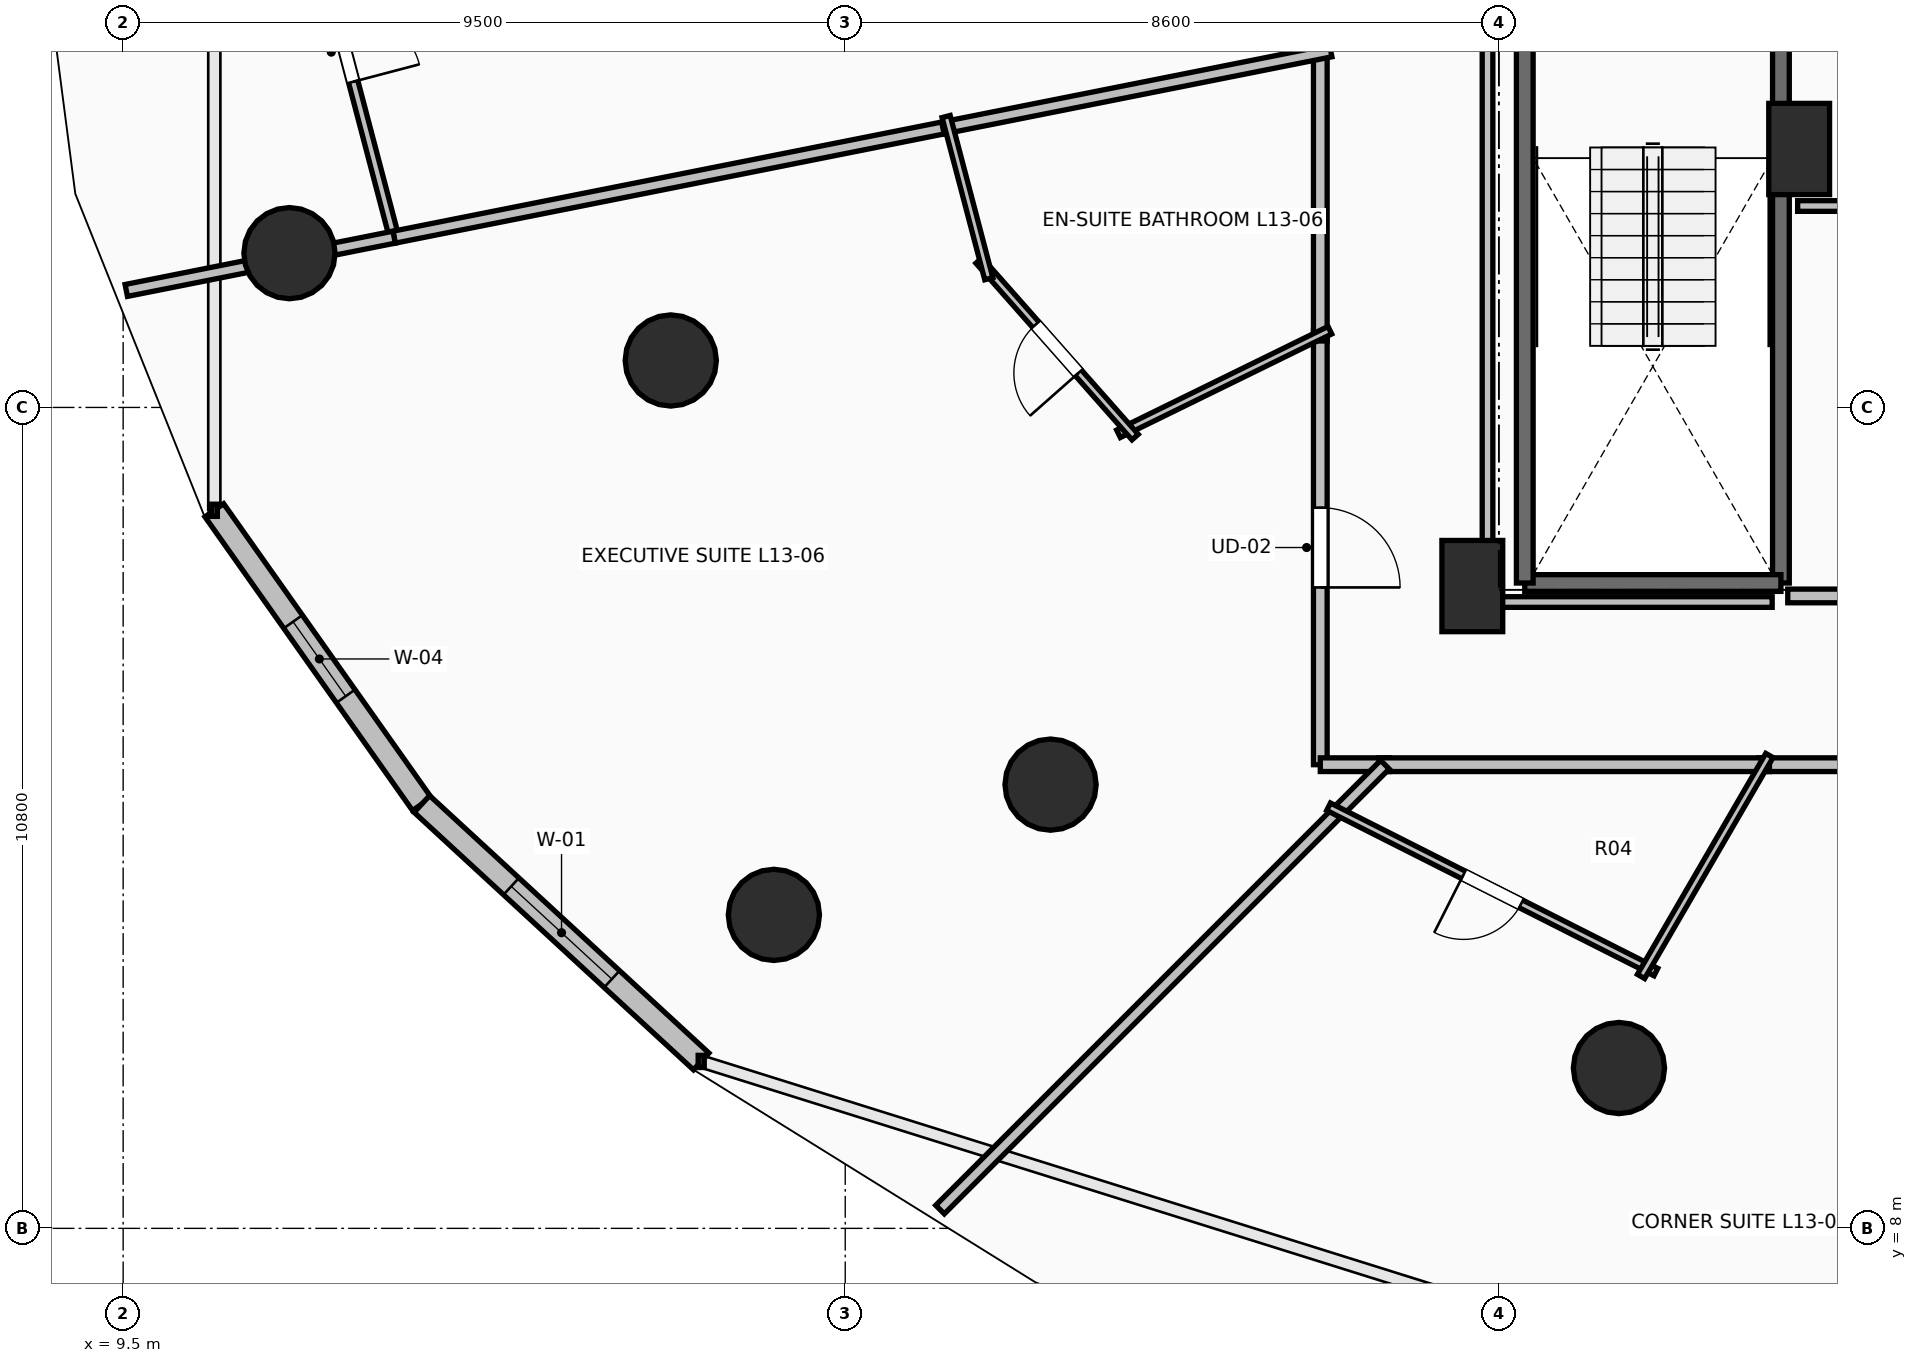
"""IFC4 building model, lengths in metres.
Left out: names, types, materials, properties, quantities, classifications, styles, units other than length and angle.
Written with IfcOpenShell. Run it as: python <this file> out.ifc"""

import sys

from ifc_helpers import new_model, si_unit, direction, frame, frame_2d, origin, origin_2d, place, context, subcontext, project, spatial, rectangle, circle, extrude, element, fill, save


model = new_model("IFC4")
c1 = context("Model", 3, precision=1e-05, world=origin(), true_north=direction((0.0, 1.0)))
c2 = subcontext(c1, "Body", "Model", "MODEL_VIEW")
j1 = project(units=[si_unit("LENGTHUNIT", "METRE"), si_unit("PLANEANGLEUNIT", "RADIAN")], contexts=[c1])
p1 = place(None, origin())
s1 = spatial("IfcSite", under=j1, at=p1, CompositionType="ELEMENT")
p2 = place(p1, origin())
s2 = spatial("IfcBuilding", under=s1, at=p2, CompositionType="ELEMENT")
p3 = place(p2, frame((0.0, 0.0, 52.0)))
s3 = spatial("IfcBuildingStorey", under=s2, at=p3, CompositionType="ELEMENT", Elevation=52.0)
for number, where, z_axis, x_axis in (
    (1, (16.705, 19.418, 0.0), (0.0, 0.0, 1.0), (-0.924, -0.383, 0.0)),
    (2, (21.701, 13.838, 0.0), (0.0, 0.0, 1.0), (-0.707, -0.707, 0.0)),
    (3, (29.179, 10.109, 0.0), (0.0, 0.0, 1.0), (-0.383, -0.924, 0.0)),
    (4, (11.688, 20.83, 0.0), (0.0, 0.0, 1.0), (-0.924, -0.383, 0.0)),
    (5, (18.061, 12.124, 0.0), (0.0, 0.0, 1.0), (-0.707, -0.707, 0.0)),
):
    element("IfcColumn", number, at=place(p3, frame(where, z_axis=z_axis, x_axis=x_axis)), inside=s3, PredefinedType="COLUMN", context=c2, shape_type="SweptSolid", body=[
        extrude(circle(Radius=0.6, at=origin_2d()), origin(), (0.0, 0.0, 1.0), 3.5),
    ])
for number, where, z_axis, x_axis in (
    (6, (27.25, 16.45, 0.0), (0.0, 0.0, 1.0), (1.0, 0.0, 0.0)),
    (7, (31.55, 22.2, 0.0), (0.0, 0.0, 1.0), (1.0, 0.0, 0.0)),
):
    element("IfcColumn", number, at=place(p3, frame(where, z_axis=z_axis, x_axis=x_axis)), inside=s3, PredefinedType="PILASTER", context=c2, shape_type="SweptSolid", body=[
        extrude(rectangle(XDim=0.8, YDim=1.2, at=origin_2d()), origin(), (0.0, 0.0, 1.0), 3.5),
    ])
p4 = place(p3, frame((10.699, 17.447, 0.0), z_axis=(0.0, 0.0, 1.0), x_axis=(0.577130815624, -0.816651713803, 0.0)))
e8 = element("IfcWall", 8, at=p4, inside=s3, PredefinedType="STANDARD", context=c2, shape_type="SweptSolid", body=[
    extrude(rectangle(XDim=4.731, YDim=0.3, at=frame_2d((2.366, 0.0))), origin(), (0.0, 0.0, 1.0), 3.24),
])
p5 = place(p4, frame((1.795, 0.0, 0.85)))
e9 = element("IfcOpeningElement", 9, at=p5, cuts=e8, PredefinedType="OPENING", context=c2, shape_type="SweptSolid", body=[
    extrude(rectangle(XDim=1.2, YDim=1.95, at=frame_2d((0.6, 0.975))), frame((0.0, 0.165, 0.0), z_axis=(0.0, -1.0, 0.0), x_axis=(1.0, 0.0, 0.0)), (0.0, 0.0, 1.0), 0.33),
])
p6 = place(p3, frame((13.43, 13.583, 0.0), z_axis=(0.0, 0.0, 1.0), x_axis=(0.735342629635, -0.677695519419, 0.0)))
e10 = element("IfcWall", 10, at=p6, inside=s3, PredefinedType="STANDARD", context=c2, shape_type="SweptSolid", body=[
    extrude(rectangle(XDim=4.997, YDim=0.3, at=frame_2d((2.499, 0.0))), origin(), (0.0, 0.0, 1.0), 3.24),
])
p7 = place(p6, frame((1.599, 0.0, 0.85)))
e11 = element("IfcOpeningElement", 11, at=p7, cuts=e10, PredefinedType="OPENING", context=c2, shape_type="SweptSolid", body=[
    extrude(rectangle(XDim=1.8, YDim=2.19, at=frame_2d((0.9, 1.095))), frame((0.0, 0.165, 0.0), z_axis=(0.0, -1.0, 0.0), x_axis=(1.0, 0.0, 0.0)), (0.0, 0.0, 1.0), 0.33),
])
p8 = place(p3, frame((31.31, 23.91, 0.0), z_axis=(0.0, 0.0, 1.0), x_axis=(0.0, -1.0, 0.0)))
e12 = element("IfcWall", 12, at=p8, inside=s3, PredefinedType="SOLIDWALL", context=c2, shape_type="SweptSolid", body=[
    extrude(rectangle(XDim=7.42, YDim=0.22, at=frame_2d((3.71, 0.0))), origin(), (0.0, 0.0, 1.0), 3.24),
])
p9 = place(p3, frame((31.31, 16.49, 0.0), z_axis=(0.0, 0.0, 1.0), x_axis=(-1.0, 0.0, 0.0)))
e13 = element("IfcWall", 13, at=p9, inside=s3, PredefinedType="SOLIDWALL", context=c2, shape_type="SweptSolid", body=[
    extrude(rectangle(XDim=3.37, YDim=0.22, at=frame_2d((1.685, 0.0))), origin(), (0.0, 0.0, 1.0), 3.24),
])
p10 = place(p3, frame((27.94, 16.49, 0.0), z_axis=(0.0, 0.0, 1.0), x_axis=(0.0, 1.0, 0.0)))
e14 = element("IfcWall", 14, at=p10, inside=s3, PredefinedType="SOLIDWALL", context=c2, shape_type="SweptSolid", body=[
    extrude(rectangle(XDim=7.42, YDim=0.22, at=frame_2d((3.71, 0.0))), origin(), (0.0, 0.0, 1.0), 3.24),
])
p11 = place(p3, frame((31.4, 16.32, 0.0), z_axis=(0.0, 0.0, 1.0), x_axis=(1.0, 0.0, 0.0)))
e15 = element("IfcWall", 15, at=p11, inside=s3, PredefinedType="PARTITIONING", context=c2, shape_type="SweptSolid", body=[
    extrude(rectangle(XDim=4.4, YDim=0.18, at=frame_2d((2.2, 0.0))), origin(), (0.0, 0.0, 1.0), 3.24),
])
p12 = place(p11, frame((1.775, 0.0, 0.0)))
e16 = element("IfcOpeningElement", 16, at=p12, cuts=e15, PredefinedType="OPENING", context=c2, shape_type="SweptSolid", body=[
    extrude(rectangle(XDim=0.85, YDim=2.1, at=frame_2d((0.425, 1.05))), frame((0.0, 0.105, 0.0), z_axis=(0.0, -1.0, 0.0), x_axis=(1.0, 0.0, 0.0)), (0.0, 0.0, 1.0), 0.21),
])
p13 = place(p3, frame((25.25, 27.774, 0.0), z_axis=(0.0, 0.0, 1.0), x_axis=(0.0, -1.0, 0.0)))
e17 = element("IfcWall", 17, at=p13, inside=s3, PredefinedType="PARTITIONING", context=c2, shape_type="SweptSolid", body=[
    extrude(rectangle(XDim=4.371, YDim=0.18, at=frame_2d((2.186, 0.0))), origin(), (0.0, 0.0, 1.0), 2.432),
])
p14 = place(p13, frame((1.66, 0.0, 0.0)))
e18 = element("IfcOpeningElement", 18, at=p14, cuts=e17, PredefinedType="OPENING", context=c2, shape_type="SweptSolid", body=[
    extrude(rectangle(XDim=1.05, YDim=2.2, at=frame_2d((0.525, 1.1))), frame((0.0, 0.105, 0.0), z_axis=(0.0, -1.0, 0.0), x_axis=(1.0, 0.0, 0.0)), (0.0, 0.0, 1.0), 0.21),
])
p15 = place(p3, frame((25.25, 19.814, 0.0), z_axis=(0.0, 0.0, 1.0), x_axis=(0.0, -1.0, 0.0)))
e19 = element("IfcWall", 19, at=p15, inside=s3, PredefinedType="PARTITIONING", context=c2, shape_type="SweptSolid", body=[
    extrude(rectangle(XDim=5.714, YDim=0.18, at=frame_2d((2.857, 0.0))), origin(), (0.0, 0.0, 1.0), 2.432),
])
p16 = place(p15, frame((2.332, 0.0, 0.0)))
e20 = element("IfcOpeningElement", 20, at=p16, cuts=e19, PredefinedType="OPENING", context=c2, shape_type="SweptSolid", body=[
    extrude(rectangle(XDim=1.05, YDim=2.2, at=frame_2d((0.525, 1.1))), frame((0.0, 0.105, 0.0), z_axis=(0.0, -1.0, 0.0), x_axis=(1.0, 0.0, 0.0)), (0.0, 0.0, 1.0), 0.21),
])
p17 = place(p3, frame((25.25, 14.1, 0.0), z_axis=(0.0, 0.0, 1.0), x_axis=(1.0, 0.0, 0.0)))
e21 = element("IfcWall", 21, at=p17, inside=s3, PredefinedType="PARTITIONING", context=c2, shape_type="SweptSolid", body=[
    extrude(rectangle(XDim=0.91, YDim=0.18, at=frame_2d((0.455, 0.0))), origin(), (0.0, 0.0, 1.0), 2.886),
])
p18 = place(p3, frame((25.25, 23.543, 0.0), z_axis=(0.0, 0.0, 1.0), x_axis=(0.0, -1.0, 0.0)))
e22 = element("IfcWall", 22, at=p18, inside=s3, PredefinedType="PARTITIONING", context=c2, shape_type="SweptSolid", body=[
    extrude(rectangle(XDim=3.869, YDim=0.18, at=frame_2d((1.935, 0.0))), origin(), (0.0, 0.0, 1.0), 3.24),
])
p19 = place(p3, frame((31.019, 14.1, 0.0), z_axis=(0.0, 0.0, 1.0), x_axis=(1.0, 0.0, 0.0)))
e23 = element("IfcWall", 23, at=p19, inside=s3, PredefinedType="PARTITIONING", context=c2, shape_type="SweptSolid", body=[
    extrude(rectangle(XDim=4.674, YDim=0.18, at=frame_2d((2.337, 0.0))), origin(), (0.0, 0.0, 1.0), 3.24),
])
p20 = place(p19, frame((1.812, 0.0, 0.0)))
e24 = element("IfcOpeningElement", 24, at=p20, cuts=e23, PredefinedType="OPENING", context=c2, shape_type="SweptSolid", body=[
    extrude(rectangle(XDim=1.05, YDim=2.2, at=frame_2d((0.525, 1.1))), frame((0.0, 0.105, 0.0), z_axis=(0.0, -1.0, 0.0), x_axis=(1.0, 0.0, 0.0)), (0.0, 0.0, 1.0), 0.21),
])
p21 = place(p3, frame((26.02, 14.1, 0.0), z_axis=(0.0, 0.0, 1.0), x_axis=(1.0, 0.0, 0.0)))
e25 = element("IfcWall", 25, at=p21, inside=s3, PredefinedType="PARTITIONING", context=c2, shape_type="SweptSolid", body=[
    extrude(rectangle(XDim=5.139, YDim=0.18, at=frame_2d((2.569, 0.0))), origin(), (0.0, 0.0, 1.0), 2.432),
])
p22 = place(p3, frame((11.76, 26.0, 0.0), z_axis=(0.0, 0.0, 1.0), x_axis=(0.254434720755, -0.967089950767, 0.0)))
e26 = element("IfcWall", 26, at=p22, inside=s3, PredefinedType="PARTITIONING", context=c2, shape_type="SweptSolid", body=[
    extrude(rectangle(XDim=5.129, YDim=0.125, at=frame_2d((2.564, 0.0))), origin(), (0.0, 0.0, 1.0), 2.432),
])
p23 = place(p22, frame((2.115, 0.0, 0.0)))
e27 = element("IfcOpeningElement", 27, at=p23, cuts=e26, PredefinedType="OPENING", context=c2, shape_type="SweptSolid", body=[
    extrude(rectangle(XDim=0.9, YDim=2.1, at=frame_2d((0.45, 1.05))), frame((0.0, 0.077, 0.0), z_axis=(0.0, -1.0, 0.0), x_axis=(1.0, 0.0, 0.0)), (0.0, 0.0, 1.0), 0.155),
])
p24 = place(p3, frame((13.065, 21.04, 0.0), z_axis=(0.0, 0.0, 1.0), x_axis=(0.980774220135, 0.195145917502, 0.0)))
e28 = element("IfcWall", 28, at=p24, inside=s3, PredefinedType="PARTITIONING", context=c2, shape_type="SweptSolid", body=[
    extrude(rectangle(XDim=7.501, YDim=0.16, at=frame_2d((3.751, 0.0))), origin(), (0.0, 0.0, 1.0), 2.972),
])
p25 = place(p3, frame((20.285, 22.476, 0.0), z_axis=(0.0, 0.0, 1.0), x_axis=(0.980785905074, 0.195087181559, 0.0)))
e29 = element("IfcWall", 29, at=p25, inside=s3, PredefinedType="PARTITIONING", context=c2, shape_type="SweptSolid", body=[
    extrude(rectangle(XDim=5.202, YDim=0.16, at=frame_2d((2.601, 0.0))), origin(), (0.0, 0.0, 1.0), 2.886),
])
p26 = place(p3, frame((9.541, 20.339, 0.0), z_axis=(0.0, 0.0, 1.0), x_axis=(0.980786594985, 0.195083713053, 0.0)))
e30 = element("IfcWall", 30, at=p26, inside=s3, PredefinedType="PARTITIONING", context=c2, shape_type="SweptSolid", body=[
    extrude(rectangle(XDim=3.593, YDim=0.16, at=frame_2d((1.796, 0.0))), origin(), (0.0, 0.0, 1.0), 2.432),
])
p27 = place(p3, frame((25.376, 19.816, 0.0), z_axis=(0.0, 0.0, 1.0), x_axis=(-0.89800930559, -0.439976461954, 0.0)))
e31 = element("IfcWall", 31, at=p27, inside=s3, PredefinedType="PARTITIONING", context=c2, shape_type="SweptSolid", body=[
    extrude(rectangle(XDim=3.096, YDim=0.11, at=frame_2d((1.548, 0.0))), origin(), (0.0, 0.0, 1.0), 3.24),
])
p28 = place(p3, frame((22.814, 18.41, 0.0), z_axis=(0.0, 0.0, 1.0), x_axis=(-0.662186487972, 0.749339078887, 0.0)))
e32 = element("IfcWall", 32, at=p28, inside=s3, PredefinedType="PARTITIONING", context=c2, shape_type="SweptSolid", body=[
    extrude(rectangle(XDim=3.101, YDim=0.11, at=frame_2d((1.551, 0.0))), origin(), (0.0, 0.0, 1.0), 2.886),
])
p29 = place(p28, frame((1.125, 0.0, 0.0)))
e33 = element("IfcOpeningElement", 33, at=p29, cuts=e32, PredefinedType="OPENING", context=c2, shape_type="SweptSolid", body=[
    extrude(rectangle(XDim=0.85, YDim=2.1, at=frame_2d((0.425, 1.05))), frame((0.0, 0.07, 0.0), z_axis=(0.0, -1.0, 0.0), x_axis=(1.0, 0.0, 0.0)), (0.0, 0.0, 1.0), 0.14),
])
p30 = place(p3, frame((20.889, 20.494, 0.0), z_axis=(0.0, 0.0, 1.0), x_axis=(-0.254389812051, 0.967101764823, 0.0)))
e34 = element("IfcWall", 34, at=p30, inside=s3, PredefinedType="PARTITIONING", context=c2, shape_type="SweptSolid", body=[
    extrude(rectangle(XDim=2.206, YDim=0.11, at=frame_2d((1.103, 0.0))), origin(), (0.0, 0.0, 1.0), 3.24),
])
p31 = place(p3, frame((20.247, 8.247, 0.0), z_axis=(0.0, 0.0, 1.0), x_axis=(0.707106781187, 0.707106781187, 0.0)))
e35 = element("IfcWall", 35, at=p31, inside=s3, PredefinedType="PARTITIONING", context=c2, shape_type="SweptSolid", body=[
    extrude(rectangle(XDim=8.277, YDim=0.16, at=frame_2d((4.139, 0.0))), origin(), (0.0, 0.0, 1.0), 2.624),
])
p32 = place(p3, frame((29.665, 11.372, 0.0), z_axis=(0.0, 0.0, 1.0), x_axis=(-0.892577568201, 0.450893873039, 0.0)))
e36 = element("IfcWall", 36, at=p32, inside=s3, PredefinedType="PARTITIONING", context=c2, shape_type="SweptSolid", body=[
    extrude(rectangle(XDim=4.824, YDim=0.11, at=frame_2d((2.412, 0.0))), origin(), (0.0, 0.0, 1.0), 2.432),
])
p33 = place(p32, frame((1.987, 0.0, 0.0)))
e37 = element("IfcOpeningElement", 37, at=p33, cuts=e36, PredefinedType="OPENING", context=c2, shape_type="SweptSolid", body=[
    extrude(rectangle(XDim=0.85, YDim=2.1, at=frame_2d((0.425, 1.05))), frame((0.0, 0.07, 0.0), z_axis=(0.0, -1.0, 0.0), x_axis=(1.0, 0.0, 0.0)), (0.0, 0.0, 1.0), 0.14),
])
p34 = place(p3, frame((31.158, 14.221, 0.0), z_axis=(0.0, 0.0, 1.0), x_axis=(-0.50222661214, -0.864736046466, 0.0)))
e38 = element("IfcWall", 38, at=p34, inside=s3, PredefinedType="PARTITIONING", context=c2, shape_type="SweptSolid", body=[
    extrude(rectangle(XDim=3.362, YDim=0.11, at=frame_2d((1.681, 0.0))), origin(), (0.0, 0.0, 1.0), 2.886),
])
p35 = place(p3, frame((35.58, 21.45, 0.0), z_axis=(0.0, 0.0, 1.0), x_axis=(-1.0, 0.0, 0.0)))
e39 = element("IfcWall", 39, at=p35, inside=s3, PredefinedType="PARTITIONING", context=c2, shape_type="SweptSolid", body=[
    extrude(rectangle(XDim=4.05, YDim=0.14, at=frame_2d((2.025, 0.0))), origin(), (0.0, 0.0, 1.0), 3.24),
])
p36 = place(p3, frame((31.195, 16.24, 0.0), z_axis=(0.0, 0.0, 1.0), x_axis=(-1.0, 0.0, 0.0)))
e40 = element("IfcWall", 40, at=p36, inside=s3, PredefinedType="PARTITIONING", context=c2, shape_type="SweptSolid", body=[
    extrude(rectangle(XDim=3.745, YDim=0.14, at=frame_2d((1.873, 0.0))), origin(), (0.0, 0.0, 1.0), 2.432),
])
p37 = place(p3, frame((27.45, 16.24, 0.0), z_axis=(0.0, 0.0, 1.0), x_axis=(0.0, 1.0, 0.0)))
e41 = element("IfcWall", 41, at=p37, inside=s3, PredefinedType="PARTITIONING", context=c2, shape_type="SweptSolid", body=[
    extrude(rectangle(XDim=7.514, YDim=0.14, at=frame_2d((3.757, 0.0))), origin(), (0.0, 0.0, 1.0), 2.432),
])
p38 = place(p5, origin())
e42 = element("IfcWindow", 42, at=p38, inside=s3, PartitioningType="SINGLE_PANEL", PredefinedType="WINDOW", context=c2, shape_type="SweptSolid", body=[
    extrude(rectangle(XDim=1.2, YDim=1.95, at=frame_2d((0.6, 0.975))), frame((0.0, 0.03, 0.0), z_axis=(0.0, -1.0, 0.0), x_axis=(1.0, 0.0, 0.0)), (0.0, 0.0, 1.0), 0.06),
])
fill(e9, e42)
p39 = place(p7, origin())
e43 = element("IfcWindow", 43, at=p39, inside=s3, PartitioningType="SINGLE_PANEL", PredefinedType="WINDOW", context=c2, shape_type="SweptSolid", body=[
    extrude(rectangle(XDim=1.8, YDim=2.19, at=frame_2d((0.9, 1.095))), frame((0.0, 0.03, 0.0), z_axis=(0.0, -1.0, 0.0), x_axis=(1.0, 0.0, 0.0)), (0.0, 0.0, 1.0), 0.06),
])
fill(e11, e43)
p40 = place(p16, origin())
e44 = element("IfcDoor", 44, at=p40, inside=s3, OperationType="SINGLE_SWING_RIGHT", PredefinedType="DOOR", context=c2, shape_type="SweptSolid", body=[
    extrude(rectangle(XDim=1.05, YDim=2.2, at=frame_2d((0.525, 1.1))), frame((0.0, 0.025, 0.0), z_axis=(0.0, -1.0, 0.0), x_axis=(1.0, 0.0, 0.0)), (0.0, 0.0, 1.0), 0.05),
])
fill(e20, e44)
p41 = place(p23, origin())
e45 = element("IfcDoor", 45, at=p41, inside=s3, OperationType="SINGLE_SWING_RIGHT", PredefinedType="DOOR", context=c2, shape_type="SweptSolid", body=[
    extrude(rectangle(XDim=0.9, YDim=2.1, at=frame_2d((0.45, 1.05))), frame((0.0, 0.025, 0.0), z_axis=(0.0, -1.0, 0.0), x_axis=(1.0, 0.0, 0.0)), (0.0, 0.0, 1.0), 0.05),
])
fill(e27, e45)
p42 = place(p29, origin())
e46 = element("IfcDoor", 46, at=p42, inside=s3, OperationType="SINGLE_SWING_LEFT", PredefinedType="DOOR", context=c2, shape_type="SweptSolid", body=[
    extrude(rectangle(XDim=0.85, YDim=2.1, at=frame_2d((0.425, 1.05))), frame((0.0, 0.025, 0.0), z_axis=(0.0, -1.0, 0.0), x_axis=(1.0, 0.0, 0.0)), (0.0, 0.0, 1.0), 0.05),
])
fill(e33, e46)
p43 = place(p33, origin())
e47 = element("IfcDoor", 47, at=p43, inside=s3, OperationType="SINGLE_SWING_RIGHT", PredefinedType="DOOR", context=c2, shape_type="SweptSolid", body=[
    extrude(rectangle(XDim=0.85, YDim=2.1, at=frame_2d((0.425, 1.05))), frame((0.0, 0.025, 0.0), z_axis=(0.0, -1.0, 0.0), x_axis=(1.0, 0.0, 0.0)), (0.0, 0.0, 1.0), 0.05),
])
fill(e37, e47)
save(model, sys.argv[1])
